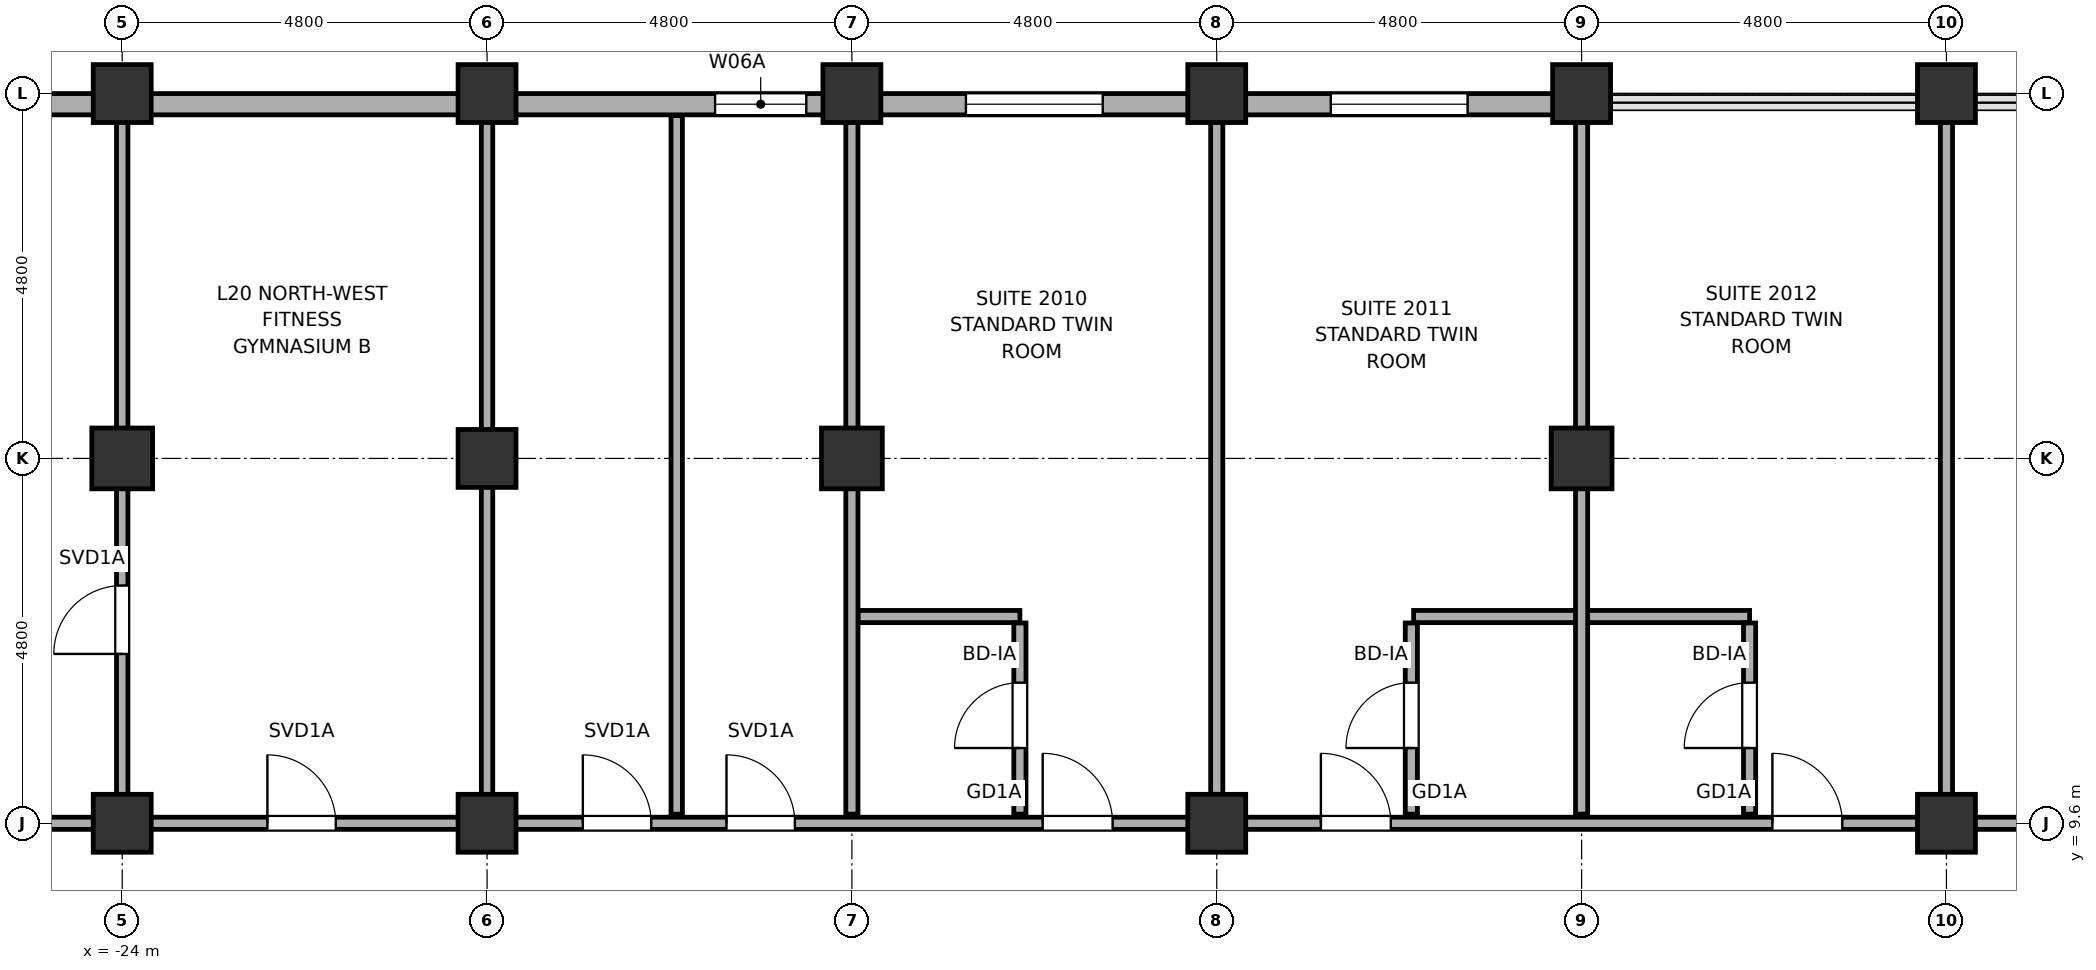
"""IFC4 building model, lengths in metres.
Left out: names, types, materials, properties, quantities, classifications, styles, units other than length and angle.
Written with IfcOpenShell. Run it as: python <this file> out.ifc"""

import sys

from ifc_helpers import new_model, si_unit, direction, frame, frame_2d, origin, origin_2d, place, context, subcontext, project, spatial, rectangle, hollow_rectangle, hollow_circle, extrude, element, fill, save


model = new_model("IFC4")
c1 = context("Model", 3, precision=1e-05, world=origin(), true_north=direction((0.0, 1.0)))
c2 = subcontext(c1, "Body", "Model", "MODEL_VIEW")
j1 = project(units=[si_unit("LENGTHUNIT", "METRE"), si_unit("PLANEANGLEUNIT", "RADIAN")], contexts=[c1])
p1 = place(None, origin())
s1 = spatial("IfcSite", under=j1, at=p1, CompositionType="ELEMENT")
p2 = place(p1, origin())
s2 = spatial("IfcBuilding", under=s1, at=p2, CompositionType="ELEMENT")
p3 = place(p2, frame((0.0, 0.0, 85.5)))
s3 = spatial("IfcBuildingStorey", under=s2, at=p3, CompositionType="ELEMENT", Elevation=85.5)
p4 = place(p3, frame((-24.0, 9.6, 0.0), z_axis=(0.0, 0.0, 1.0), x_axis=(1.0, 0.0, 0.0)))
e1 = element("IfcColumn", 1, at=p4, inside=s3, PredefinedType="COLUMN", context=c2, shape_type="SweptSolid", body=[
    extrude(hollow_circle(Radius=0.381, WallThickness=0.032, at=origin_2d()), origin(), (0.0, 0.0, 1.0), 3.7),
])
p5 = place(p3, frame((-24.0, 14.4, 0.0), z_axis=(0.0, 0.0, 1.0), x_axis=(1.0, 0.0, 0.0)))
e2 = element("IfcColumn", 2, at=p5, inside=s3, PredefinedType="COLUMN", context=c2, shape_type="SweptSolid", body=[
    extrude(hollow_rectangle(XDim=0.8, YDim=0.8, WallThickness=0.036, at=origin_2d()), origin(), (0.0, 0.0, 1.0), 3.7),
])
for number, where, z_axis, x_axis in (
    (3, (-24.0, 19.2, 0.0), (0.0, 0.0, 1.0), (1.0, 0.0, 0.0)),
    (4, (-19.2, 9.6, 0.0), (0.0, 0.0, 1.0), (1.0, 0.0, 0.0)),
    (5, (-19.2, 14.4, 0.0), (0.0, 0.0, 1.0), (1.0, 0.0, 0.0)),
    (6, (-19.2, 19.2, 0.0), (0.0, 0.0, 1.0), (1.0, 0.0, 0.0)),
):
    element("IfcColumn", number, at=place(p3, frame(where, z_axis=z_axis, x_axis=x_axis)), inside=s3, PredefinedType="COLUMN", context=c2, shape_type="SweptSolid", body=[
        extrude(hollow_circle(Radius=0.381, WallThickness=0.032, at=origin_2d()), origin(), (0.0, 0.0, 1.0), 3.7),
    ])
p6 = place(p3, frame((-14.4, 14.4, 0.0), z_axis=(0.0, 0.0, 1.0), x_axis=(1.0, 0.0, 0.0)))
e7 = element("IfcColumn", 7, at=p6, inside=s3, PredefinedType="COLUMN", context=c2, shape_type="SweptSolid", body=[
    extrude(hollow_rectangle(XDim=0.8, YDim=0.8, WallThickness=0.036, at=origin_2d()), origin(), (0.0, 0.0, 1.0), 3.7),
])
for number, where, z_axis, x_axis in (
    (8, (-14.4, 19.2, 0.0), (0.0, 0.0, 1.0), (1.0, 0.0, 0.0)),
    (9, (-9.6, 9.6, 0.0), (0.0, 0.0, 1.0), (1.0, 0.0, 0.0)),
    (10, (-9.6, 19.2, 0.0), (0.0, 0.0, 1.0), (1.0, 0.0, 0.0)),
):
    element("IfcColumn", number, at=place(p3, frame(where, z_axis=z_axis, x_axis=x_axis)), inside=s3, PredefinedType="COLUMN", context=c2, shape_type="SweptSolid", body=[
        extrude(hollow_circle(Radius=0.381, WallThickness=0.032, at=origin_2d()), origin(), (0.0, 0.0, 1.0), 3.7),
    ])
p7 = place(p3, frame((-4.8, 14.4, 0.0), z_axis=(0.0, 0.0, 1.0), x_axis=(1.0, 0.0, 0.0)))
e11 = element("IfcColumn", 11, at=p7, inside=s3, PredefinedType="COLUMN", context=c2, shape_type="SweptSolid", body=[
    extrude(hollow_rectangle(XDim=0.8, YDim=0.8, WallThickness=0.036, at=origin_2d()), origin(), (0.0, 0.0, 1.0), 3.7),
])
for number, where, z_axis, x_axis in (
    (12, (-4.8, 19.2, 0.0), (0.0, 0.0, 1.0), (1.0, 0.0, 0.0)),
    (13, (0.0, 9.6, 0.0), (0.0, 0.0, 1.0), (1.0, 0.0, 0.0)),
    (14, (0.0, 19.2, 0.0), (0.0, 0.0, 1.0), (1.0, 0.0, 0.0)),
):
    element("IfcColumn", number, at=place(p3, frame(where, z_axis=z_axis, x_axis=x_axis)), inside=s3, PredefinedType="COLUMN", context=c2, shape_type="SweptSolid", body=[
        extrude(hollow_circle(Radius=0.381, WallThickness=0.032, at=origin_2d()), origin(), (0.0, 0.0, 1.0), 3.7),
    ])
p8 = place(p3, frame((-25.2, 19.06, 0.0), z_axis=(0.0, 0.0, 1.0), x_axis=(1.0, 0.0, 0.0)))
e15 = element("IfcWall", 15, at=p8, inside=s3, PredefinedType="SOLIDWALL", context=c2, shape_type="SweptSolid", body=[
    extrude(rectangle(XDim=20.45, YDim=0.28, at=frame_2d((10.225, 0.0))), origin(), (0.0, 0.0, 1.0), 2.05),
])
p9 = place(p8, frame((9.0, 0.0, 0.75)))
e16 = element("IfcOpeningElement", 16, at=p9, cuts=e15, PredefinedType="OPENING", context=c2, shape_type="SweptSolid", body=[
    extrude(rectangle(XDim=1.2, YDim=1.15, at=frame_2d((0.6, 0.575))), frame((0.0, 0.155, 0.0), z_axis=(0.0, -1.0, 0.0), x_axis=(1.0, 0.0, 0.0)), (0.0, 0.0, 1.0), 0.31),
])
p10 = place(p8, frame((12.3, 0.0, 0.75)))
e17 = element("IfcOpeningElement", 17, at=p10, cuts=e15, PredefinedType="OPENING", context=c2, shape_type="SweptSolid", body=[
    extrude(rectangle(XDim=1.8, YDim=1.15, at=frame_2d((0.9, 0.575))), frame((0.0, 0.155, 0.0), z_axis=(0.0, -1.0, 0.0), x_axis=(1.0, 0.0, 0.0)), (0.0, 0.0, 1.0), 0.31),
])
p11 = place(p8, frame((17.1, 0.0, 0.75)))
e18 = element("IfcOpeningElement", 18, at=p11, cuts=e15, PredefinedType="OPENING", context=c2, shape_type="SweptSolid", body=[
    extrude(rectangle(XDim=1.8, YDim=1.15, at=frame_2d((0.9, 0.575))), frame((0.0, 0.155, 0.0), z_axis=(0.0, -1.0, 0.0), x_axis=(1.0, 0.0, 0.0)), (0.0, 0.0, 1.0), 0.31),
])
p12 = place(p3, frame((-28.63, 9.6, 0.0), z_axis=(0.0, 0.0, 1.0), x_axis=(1.0, 0.0, 0.0)))
e19 = element("IfcWall", 19, at=p12, inside=s3, PredefinedType="PARTITIONING", context=c2, shape_type="SweptSolid", body=[
    extrude(rectangle(XDim=62.06, YDim=0.16, at=frame_2d((31.03, 0.0))), origin(), (0.0, 0.0, 1.0), 2.05),
])
p13 = place(p12, frame((6.54, 0.0, 0.0)))
e20 = element("IfcOpeningElement", 20, at=p13, cuts=e19, PredefinedType="OPENING", context=c2, shape_type="SweptSolid", body=[
    extrude(rectangle(XDim=0.9, YDim=2.02, at=frame_2d((0.45, 1.01))), frame((0.0, 0.095, 0.0), z_axis=(0.0, -1.0, 0.0), x_axis=(1.0, 0.0, 0.0)), (0.0, 0.0, 1.0), 0.19),
])
p14 = place(p12, frame((54.62, 0.0, 0.0)))
e21 = element("IfcOpeningElement", 21, at=p14, cuts=e19, PredefinedType="OPENING", context=c2, shape_type="SweptSolid", body=[
    extrude(rectangle(XDim=0.9, YDim=2.02, at=frame_2d((0.45, 1.01))), frame((0.0, 0.095, 0.0), z_axis=(0.0, -1.0, 0.0), x_axis=(1.0, 0.0, 0.0)), (0.0, 0.0, 1.0), 0.19),
])
p15 = place(p12, frame((10.69, 0.0, 0.0)))
e22 = element("IfcOpeningElement", 22, at=p15, cuts=e19, PredefinedType="OPENING", context=c2, shape_type="SweptSolid", body=[
    extrude(rectangle(XDim=0.9, YDim=2.02, at=frame_2d((0.45, 1.01))), frame((0.0, 0.095, 0.0), z_axis=(0.0, -1.0, 0.0), x_axis=(1.0, 0.0, 0.0)), (0.0, 0.0, 1.0), 0.19),
])
p16 = place(p12, frame((12.58, 0.0, 0.0)))
e23 = element("IfcOpeningElement", 23, at=p16, cuts=e19, PredefinedType="OPENING", context=c2, shape_type="SweptSolid", body=[
    extrude(rectangle(XDim=0.9, YDim=2.02, at=frame_2d((0.45, 1.01))), frame((0.0, 0.095, 0.0), z_axis=(0.0, -1.0, 0.0), x_axis=(1.0, 0.0, 0.0)), (0.0, 0.0, 1.0), 0.19),
])
p17 = place(p12, frame((16.74, 0.0, 0.0)))
e24 = element("IfcOpeningElement", 24, at=p17, cuts=e19, PredefinedType="OPENING", context=c2, shape_type="SweptSolid", body=[
    extrude(rectangle(XDim=0.92, YDim=2.02, at=frame_2d((0.46, 1.01))), frame((0.0, 0.095, 0.0), z_axis=(0.0, -1.0, 0.0), x_axis=(1.0, 0.0, 0.0)), (0.0, 0.0, 1.0), 0.19),
])
p18 = place(p12, frame((20.4, 0.0, 0.0)))
e25 = element("IfcOpeningElement", 25, at=p18, cuts=e19, PredefinedType="OPENING", context=c2, shape_type="SweptSolid", body=[
    extrude(rectangle(XDim=0.92, YDim=2.02, at=frame_2d((0.46, 1.01))), frame((0.0, 0.095, 0.0), z_axis=(0.0, -1.0, 0.0), x_axis=(1.0, 0.0, 0.0)), (0.0, 0.0, 1.0), 0.19),
])
p19 = place(p12, frame((26.34, 0.0, 0.0)))
e26 = element("IfcOpeningElement", 26, at=p19, cuts=e19, PredefinedType="OPENING", context=c2, shape_type="SweptSolid", body=[
    extrude(rectangle(XDim=0.92, YDim=2.02, at=frame_2d((0.46, 1.01))), frame((0.0, 0.095, 0.0), z_axis=(0.0, -1.0, 0.0), x_axis=(1.0, 0.0, 0.0)), (0.0, 0.0, 1.0), 0.19),
])
p20 = place(p12, frame((30.0, 0.0, 0.0)))
e27 = element("IfcOpeningElement", 27, at=p20, cuts=e19, PredefinedType="OPENING", context=c2, shape_type="SweptSolid", body=[
    extrude(rectangle(XDim=0.92, YDim=2.02, at=frame_2d((0.46, 1.01))), frame((0.0, 0.095, 0.0), z_axis=(0.0, -1.0, 0.0), x_axis=(1.0, 0.0, 0.0)), (0.0, 0.0, 1.0), 0.19),
])
p21 = place(p12, frame((35.38, 0.0, 0.0)))
e28 = element("IfcOpeningElement", 28, at=p21, cuts=e19, PredefinedType="OPENING", context=c2, shape_type="SweptSolid", body=[
    extrude(rectangle(XDim=0.9, YDim=2.02, at=frame_2d((0.45, 1.01))), frame((0.0, 0.095, 0.0), z_axis=(0.0, -1.0, 0.0), x_axis=(1.0, 0.0, 0.0)), (0.0, 0.0, 1.0), 0.19),
])
p22 = place(p12, frame((40.18, 0.0, 0.0)))
e29 = element("IfcOpeningElement", 29, at=p22, cuts=e19, PredefinedType="OPENING", context=c2, shape_type="SweptSolid", body=[
    extrude(rectangle(XDim=0.9, YDim=2.02, at=frame_2d((0.45, 1.01))), frame((0.0, 0.095, 0.0), z_axis=(0.0, -1.0, 0.0), x_axis=(1.0, 0.0, 0.0)), (0.0, 0.0, 1.0), 0.19),
])
p23 = place(p12, frame((44.98, 0.0, 0.0)))
e30 = element("IfcOpeningElement", 30, at=p23, cuts=e19, PredefinedType="OPENING", context=c2, shape_type="SweptSolid", body=[
    extrude(rectangle(XDim=0.9, YDim=2.02, at=frame_2d((0.45, 1.01))), frame((0.0, 0.095, 0.0), z_axis=(0.0, -1.0, 0.0), x_axis=(1.0, 0.0, 0.0)), (0.0, 0.0, 1.0), 0.19),
])
p24 = place(p12, frame((50.34, 0.0, 0.0)))
e31 = element("IfcOpeningElement", 31, at=p24, cuts=e19, PredefinedType="OPENING", context=c2, shape_type="SweptSolid", body=[
    extrude(rectangle(XDim=0.92, YDim=2.02, at=frame_2d((0.46, 1.01))), frame((0.0, 0.095, 0.0), z_axis=(0.0, -1.0, 0.0), x_axis=(1.0, 0.0, 0.0)), (0.0, 0.0, 1.0), 0.19),
])
p25 = place(p3, frame((-14.32, 12.32, 0.0), z_axis=(0.0, 0.0, 1.0), x_axis=(1.0, 0.0, 0.0)))
e32 = element("IfcWall", 32, at=p25, inside=s3, PredefinedType="PARTITIONING", context=c2, shape_type="SweptSolid", body=[
    extrude(rectangle(XDim=2.13, YDim=0.16, at=frame_2d((1.065, 0.0))), origin(), (0.0, 0.0, 1.0), 2.75),
])
p26 = place(p3, frame((-7.01, 12.32, 0.0), z_axis=(0.0, 0.0, 1.0), x_axis=(1.0, 0.0, 0.0)))
e33 = element("IfcWall", 33, at=p26, inside=s3, PredefinedType="PARTITIONING", context=c2, shape_type="SweptSolid", body=[
    extrude(rectangle(XDim=4.42, YDim=0.16, at=frame_2d((2.21, 0.0))), origin(), (0.0, 0.0, 1.0), 2.75),
])
p27 = place(p3, frame((-24.0, 9.72, 0.0), z_axis=(0.0, 0.0, 1.0), x_axis=(0.0, 1.0, 0.0)))
e34 = element("IfcWall", 34, at=p27, inside=s3, PredefinedType="PARTITIONING", context=c2, shape_type="SweptSolid", body=[
    extrude(rectangle(XDim=9.19, YDim=0.15, at=frame_2d((4.595, 0.0))), origin(), (0.0, 0.0, 1.0), 2.05),
])
p28 = place(p27, frame((2.108, 0.0, 0.0)))
e35 = element("IfcOpeningElement", 35, at=p28, cuts=e34, PredefinedType="OPENING", context=c2, shape_type="SweptSolid", body=[
    extrude(rectangle(XDim=0.9, YDim=2.02, at=frame_2d((0.45, 1.01))), frame((0.0, 0.09, 0.0), z_axis=(0.0, -1.0, 0.0), x_axis=(1.0, 0.0, 0.0)), (0.0, 0.0, 1.0), 0.18),
])
for number, where, z_axis, x_axis in (
    (36, (-19.2, 9.72, 0.0), (0.0, 0.0, 1.0), (0.0, 1.0, 0.0)),
    (37, (-16.705, 9.72, 0.0), (0.0, 0.0, 1.0), (0.0, 1.0, 0.0)),
):
    element("IfcWall", number, at=place(p3, frame(where, z_axis=z_axis, x_axis=x_axis)), inside=s3, PredefinedType="PARTITIONING", context=c2, shape_type="SweptSolid", body=[
        extrude(rectangle(XDim=9.19, YDim=0.15, at=frame_2d((4.595, 0.0))), origin(), (0.0, 0.0, 1.0), 2.05),
    ])
p29 = place(p3, frame((-14.4, 9.72, 0.0), z_axis=(0.0, 0.0, 1.0), x_axis=(0.0, 1.0, 0.0)))
e38 = element("IfcWall", 38, at=p29, inside=s3, PredefinedType="PARTITIONING", context=c2, shape_type="SweptSolid", body=[
    extrude(rectangle(XDim=9.19, YDim=0.16, at=frame_2d((4.595, 0.0))), origin(), (0.0, 0.0, 1.0), 2.05),
])
p30 = place(p3, frame((-12.19, 9.72, 0.0), z_axis=(0.0, 0.0, 1.0), x_axis=(0.0, 1.0, 0.0)))
e39 = element("IfcWall", 39, at=p30, inside=s3, PredefinedType="PARTITIONING", context=c2, shape_type="SweptSolid", body=[
    extrude(rectangle(XDim=2.515, YDim=0.16, at=frame_2d((1.258, 0.0))), origin(), (0.0, 0.0, 1.0), 2.05),
])
p31 = place(p30, frame((0.87, 0.0, 0.0)))
e40 = element("IfcOpeningElement", 40, at=p31, cuts=e39, PredefinedType="OPENING", context=c2, shape_type="SweptSolid", body=[
    extrude(rectangle(XDim=0.86, YDim=2.02, at=frame_2d((0.43, 1.01))), frame((0.0, 0.095, 0.0), z_axis=(0.0, -1.0, 0.0), x_axis=(1.0, 0.0, 0.0)), (0.0, 0.0, 1.0), 0.19),
])
p32 = place(p3, frame((-9.6, 9.72, 0.0), z_axis=(0.0, 0.0, 1.0), x_axis=(0.0, 1.0, 0.0)))
e41 = element("IfcWall", 41, at=p32, inside=s3, PredefinedType="PARTITIONING", context=c2, shape_type="SweptSolid", body=[
    extrude(rectangle(XDim=9.19, YDim=0.16, at=frame_2d((4.595, 0.0))), origin(), (0.0, 0.0, 1.0), 2.05),
])
p33 = place(p3, frame((-7.04, 9.72, 0.0), z_axis=(0.0, 0.0, 1.0), x_axis=(0.0, 1.0, 0.0)))
e42 = element("IfcWall", 42, at=p33, inside=s3, PredefinedType="PARTITIONING", context=c2, shape_type="SweptSolid", body=[
    extrude(rectangle(XDim=2.515, YDim=0.16, at=frame_2d((1.258, 0.0))), origin(), (0.0, 0.0, 1.0), 2.05),
])
p34 = place(p33, frame((0.87, 0.0, 0.0)))
e43 = element("IfcOpeningElement", 43, at=p34, cuts=e42, PredefinedType="OPENING", context=c2, shape_type="SweptSolid", body=[
    extrude(rectangle(XDim=0.86, YDim=2.02, at=frame_2d((0.43, 1.01))), frame((0.0, 0.095, 0.0), z_axis=(0.0, -1.0, 0.0), x_axis=(1.0, 0.0, 0.0)), (0.0, 0.0, 1.0), 0.19),
])
p35 = place(p3, frame((-4.8, 9.72, 0.0), z_axis=(0.0, 0.0, 1.0), x_axis=(0.0, 1.0, 0.0)))
e44 = element("IfcWall", 44, at=p35, inside=s3, PredefinedType="PARTITIONING", context=c2, shape_type="SweptSolid", body=[
    extrude(rectangle(XDim=9.19, YDim=0.16, at=frame_2d((4.595, 0.0))), origin(), (0.0, 0.0, 1.0), 2.05),
])
p36 = place(p3, frame((-2.59, 9.72, 0.0), z_axis=(0.0, 0.0, 1.0), x_axis=(0.0, 1.0, 0.0)))
e45 = element("IfcWall", 45, at=p36, inside=s3, PredefinedType="PARTITIONING", context=c2, shape_type="SweptSolid", body=[
    extrude(rectangle(XDim=2.515, YDim=0.16, at=frame_2d((1.258, 0.0))), origin(), (0.0, 0.0, 1.0), 2.05),
])
p37 = place(p36, frame((0.87, 0.0, 0.0)))
e46 = element("IfcOpeningElement", 46, at=p37, cuts=e45, PredefinedType="OPENING", context=c2, shape_type="SweptSolid", body=[
    extrude(rectangle(XDim=0.86, YDim=2.02, at=frame_2d((0.43, 1.01))), frame((0.0, 0.095, 0.0), z_axis=(0.0, -1.0, 0.0), x_axis=(1.0, 0.0, 0.0)), (0.0, 0.0, 1.0), 0.19),
])
p38 = place(p3, frame((0.0, 9.72, 0.0), z_axis=(0.0, 0.0, 1.0), x_axis=(0.0, 1.0, 0.0)))
e47 = element("IfcWall", 47, at=p38, inside=s3, PredefinedType="PARTITIONING", context=c2, shape_type="SweptSolid", body=[
    extrude(rectangle(XDim=9.275, YDim=0.16, at=frame_2d((4.638, 0.0))), origin(), (0.0, 0.0, 1.0), 2.05),
])
p39 = place(p9, origin())
e48 = element("IfcWindow", 48, at=p39, inside=s3, PartitioningType="SINGLE_PANEL", PredefinedType="WINDOW", context=c2, shape_type="SweptSolid", body=[
    extrude(rectangle(XDim=1.2, YDim=1.15, at=frame_2d((0.6, 0.575))), frame((0.0, 0.03, 0.0), z_axis=(0.0, -1.0, 0.0), x_axis=(1.0, 0.0, 0.0)), (0.0, 0.0, 1.0), 0.06),
])
fill(e16, e48)
p40 = place(p10, origin())
e49 = element("IfcWindow", 49, at=p40, inside=s3, PartitioningType="SINGLE_PANEL", PredefinedType="WINDOW", context=c2, shape_type="SweptSolid", body=[
    extrude(rectangle(XDim=1.8, YDim=1.15, at=frame_2d((0.9, 0.575))), frame((0.0, 0.03, 0.0), z_axis=(0.0, -1.0, 0.0), x_axis=(1.0, 0.0, 0.0)), (0.0, 0.0, 1.0), 0.06),
])
fill(e17, e49)
p41 = place(p11, origin())
e50 = element("IfcWindow", 50, at=p41, inside=s3, PartitioningType="SINGLE_PANEL", PredefinedType="WINDOW", context=c2, shape_type="SweptSolid", body=[
    extrude(rectangle(XDim=1.8, YDim=1.15, at=frame_2d((0.9, 0.575))), frame((0.0, 0.03, 0.0), z_axis=(0.0, -1.0, 0.0), x_axis=(1.0, 0.0, 0.0)), (0.0, 0.0, 1.0), 0.06),
])
fill(e18, e50)
p42 = place(p28, origin())
e51 = element("IfcDoor", 51, at=p42, inside=s3, OperationType="SINGLE_SWING_RIGHT", PredefinedType="DOOR", context=c2, shape_type="SweptSolid", body=[
    extrude(rectangle(XDim=0.9, YDim=2.02, at=frame_2d((0.45, 1.01))), frame((0.0, 0.025, 0.0), z_axis=(0.0, -1.0, 0.0), x_axis=(1.0, 0.0, 0.0)), (0.0, 0.0, 1.0), 0.05),
])
fill(e35, e51)
p43 = place(p13, origin())
e52 = element("IfcDoor", 52, at=p43, inside=s3, OperationType="SINGLE_SWING_RIGHT", PredefinedType="DOOR", context=c2, shape_type="SweptSolid", body=[
    extrude(rectangle(XDim=0.9, YDim=2.02, at=frame_2d((0.45, 1.01))), frame((0.0, 0.025, 0.0), z_axis=(0.0, -1.0, 0.0), x_axis=(1.0, 0.0, 0.0)), (0.0, 0.0, 1.0), 0.05),
])
fill(e20, e52)
p44 = place(p15, origin())
e53 = element("IfcDoor", 53, at=p44, inside=s3, OperationType="SINGLE_SWING_LEFT", PredefinedType="DOOR", context=c2, shape_type="SweptSolid", body=[
    extrude(rectangle(XDim=0.9, YDim=2.02, at=frame_2d((0.45, 1.01))), frame((0.0, 0.025, 0.0), z_axis=(0.0, -1.0, 0.0), x_axis=(1.0, 0.0, 0.0)), (0.0, 0.0, 1.0), 0.05),
])
fill(e22, e53)
p45 = place(p16, origin())
e54 = element("IfcDoor", 54, at=p45, inside=s3, OperationType="SINGLE_SWING_RIGHT", PredefinedType="DOOR", context=c2, shape_type="SweptSolid", body=[
    extrude(rectangle(XDim=0.9, YDim=2.02, at=frame_2d((0.45, 1.01))), frame((0.0, 0.025, 0.0), z_axis=(0.0, -1.0, 0.0), x_axis=(1.0, 0.0, 0.0)), (0.0, 0.0, 1.0), 0.05),
])
fill(e23, e54)
p46 = place(p17, origin())
e55 = element("IfcDoor", 55, at=p46, inside=s3, OperationType="SINGLE_SWING_LEFT", PredefinedType="DOOR", context=c2, shape_type="SweptSolid", body=[
    extrude(rectangle(XDim=0.92, YDim=2.02, at=frame_2d((0.46, 1.01))), frame((0.0, 0.025, 0.0), z_axis=(0.0, -1.0, 0.0), x_axis=(1.0, 0.0, 0.0)), (0.0, 0.0, 1.0), 0.05),
])
fill(e24, e55)
p47 = place(p31, origin())
e56 = element("IfcDoor", 56, at=p47, inside=s3, OperationType="SINGLE_SWING_LEFT", PredefinedType="DOOR", context=c2, shape_type="SweptSolid", body=[
    extrude(rectangle(XDim=0.86, YDim=2.02, at=frame_2d((0.43, 1.01))), frame((0.0, 0.025, 0.0), z_axis=(0.0, -1.0, 0.0), x_axis=(1.0, 0.0, 0.0)), (0.0, 0.0, 1.0), 0.05),
])
fill(e40, e56)
p48 = place(p18, origin())
e57 = element("IfcDoor", 57, at=p48, inside=s3, OperationType="SINGLE_SWING_RIGHT", PredefinedType="DOOR", context=c2, shape_type="SweptSolid", body=[
    extrude(rectangle(XDim=0.92, YDim=2.02, at=frame_2d((0.46, 1.01))), frame((0.0, 0.025, 0.0), z_axis=(0.0, -1.0, 0.0), x_axis=(1.0, 0.0, 0.0)), (0.0, 0.0, 1.0), 0.05),
])
fill(e25, e57)
p49 = place(p34, origin())
e58 = element("IfcDoor", 58, at=p49, inside=s3, OperationType="SINGLE_SWING_LEFT", PredefinedType="DOOR", context=c2, shape_type="SweptSolid", body=[
    extrude(rectangle(XDim=0.86, YDim=2.02, at=frame_2d((0.43, 1.01))), frame((0.0, 0.025, 0.0), z_axis=(0.0, -1.0, 0.0), x_axis=(1.0, 0.0, 0.0)), (0.0, 0.0, 1.0), 0.05),
])
fill(e43, e58)
p50 = place(p19, origin())
e59 = element("IfcDoor", 59, at=p50, inside=s3, OperationType="SINGLE_SWING_RIGHT", PredefinedType="DOOR", context=c2, shape_type="SweptSolid", body=[
    extrude(rectangle(XDim=0.92, YDim=2.02, at=frame_2d((0.46, 1.01))), frame((0.0, 0.025, 0.0), z_axis=(0.0, -1.0, 0.0), x_axis=(1.0, 0.0, 0.0)), (0.0, 0.0, 1.0), 0.05),
])
fill(e26, e59)
p51 = place(p37, origin())
e60 = element("IfcDoor", 60, at=p51, inside=s3, OperationType="SINGLE_SWING_LEFT", PredefinedType="DOOR", context=c2, shape_type="SweptSolid", body=[
    extrude(rectangle(XDim=0.86, YDim=2.02, at=frame_2d((0.43, 1.01))), frame((0.0, 0.025, 0.0), z_axis=(0.0, -1.0, 0.0), x_axis=(1.0, 0.0, 0.0)), (0.0, 0.0, 1.0), 0.05),
])
fill(e46, e60)
save(model, sys.argv[1])
